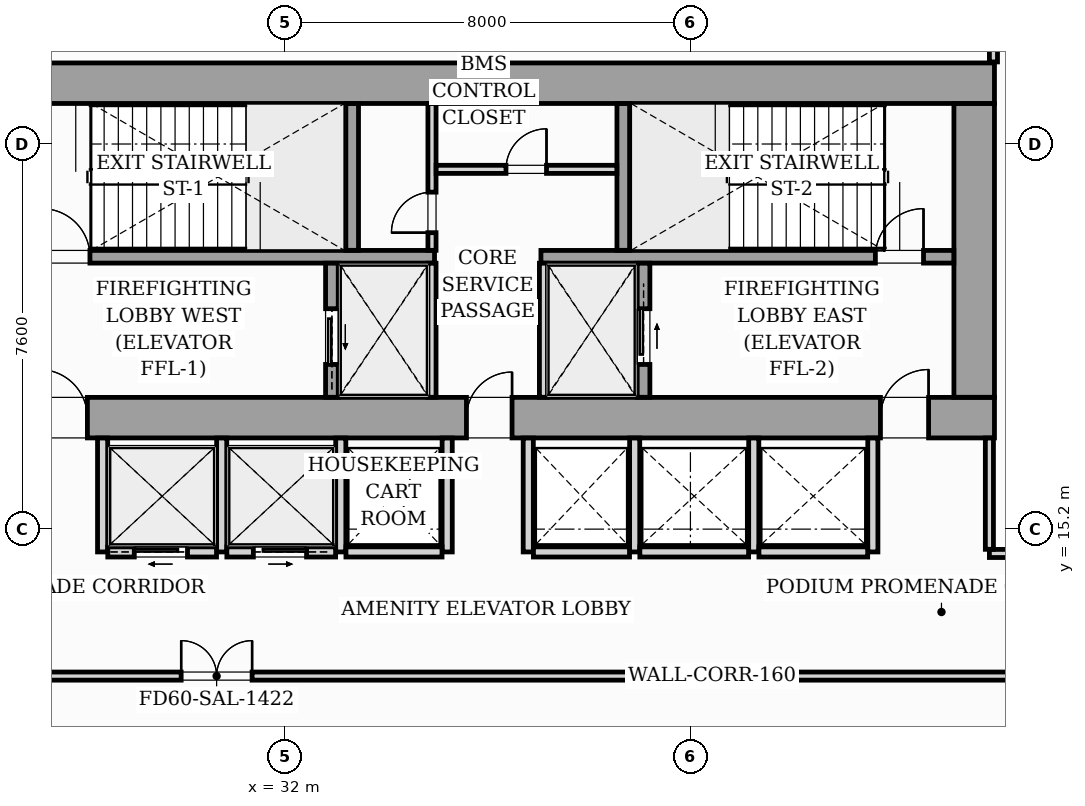
"""IFC4 building model, lengths in metres.
Left out: names, types, materials, properties, quantities, classifications, styles, units other than length and angle.
Written with IfcOpenShell. Run it as: python <this file> out.ifc"""

import sys

from ifc_helpers import new_model, si_unit, direction, frame, frame_2d, origin, origin_2d, place, context, subcontext, project, spatial, rectangle, i_section, extrude, source, transform, mapped, element, fill, save


model = new_model("IFC4")
c1 = context("Model", 3, precision=1e-05, world=origin(), true_north=direction((0.0, 1.0)))
c2 = subcontext(c1, "Body", "Model", "MODEL_VIEW")
j1 = project(units=[si_unit("LENGTHUNIT", "METRE"), si_unit("PLANEANGLEUNIT", "RADIAN")], contexts=[c1])
p1 = place(None, origin())
s1 = spatial("IfcSite", under=j1, at=p1, CompositionType="ELEMENT")
p2 = place(p1, origin())
s2 = spatial("IfcBuilding", under=s1, at=p2, CompositionType="ELEMENT")
p3 = place(p2, frame((0.0, 0.0, 5.0)))
s3 = spatial("IfcBuildingStorey", under=s2, at=p3, CompositionType="ELEMENT", Elevation=5.0)
m1 = source(origin(), c2, "Body", "SweptSolid", [
    extrude(i_section(OverallWidth=0.437, OverallDepth=0.514, WebThickness=0.061, FlangeThickness=0.097, FilletRadius=0.018, at=origin_2d()), origin(), (0.0, 0.0, 1.0), 4.496),
])
for number, where, z_axis, x_axis in (
    (1, (33.12, 17.4, 0.002), (0.0, 0.0, 1.0), (1.0, 0.0, 0.0)),
    (2, (38.88, 17.4, 0.002), (0.0, 0.0, 1.0), (1.0, 0.0, 0.0)),
    (3, (45.6, 17.4, 0.002), (0.0, 0.0, 1.0), (1.0, 0.0, 0.0)),
    (4, (33.12, 24.0, 0.002), (0.0, 0.0, 1.0), (1.0, 0.0, 0.0)),
    (5, (38.88, 24.0, 0.002), (0.0, 0.0, 1.0), (1.0, 0.0, 0.0)),
    (6, (45.6, 24.0, 0.002), (0.0, 0.0, 1.0), (1.0, 0.0, 0.0)),
):
    element("IfcColumn", number, at=place(p3, frame(where, z_axis=z_axis, x_axis=x_axis)), inside=s3, PredefinedType="PILASTER", context=c2, shape_type="MappedRepresentation", body=[
        mapped(m1, transform((0.0, 0.0, 0.0), scale=1.0)),
    ])
p4 = place(p3, frame((26.0, 17.4, 0.0), z_axis=(0.0, 0.0, 1.0), x_axis=(1.0, 0.0, 0.0)))
e7 = element("IfcWall", 7, at=p4, inside=s3, PredefinedType="SHEAR", context=c2, shape_type="SweptSolid", body=[
    extrude(rectangle(XDim=20.0, YDim=0.8, at=frame_2d((10.0, 0.0))), origin(), (0.0, 0.0, 1.0), 4.5),
])
p5 = place(p4, frame((1.15, 0.0, 0.0)))
e8 = element("IfcOpeningElement", 8, at=p5, cuts=e7, PredefinedType="OPENING", context=c2, shape_type="SweptSolid", body=[
    extrude(rectangle(XDim=0.95, YDim=2.06, at=frame_2d((0.475, 1.03))), frame((0.0, 0.41, 0.0), z_axis=(0.0, -1.0, 0.0), x_axis=(1.0, 0.0, 0.0)), (0.0, 0.0, 1.0), 0.82),
])
p6 = place(p4, frame((9.58, 0.0, 0.0)))
e9 = element("IfcOpeningElement", 9, at=p6, cuts=e7, PredefinedType="OPENING", context=c2, shape_type="SweptSolid", body=[
    extrude(rectangle(XDim=0.9, YDim=2.06, at=frame_2d((0.45, 1.03))), frame((0.0, 0.41, 0.0), z_axis=(0.0, -1.0, 0.0), x_axis=(1.0, 0.0, 0.0)), (0.0, 0.0, 1.0), 0.82),
])
p7 = place(p4, frame((17.75, 0.0, 0.0)))
e10 = element("IfcOpeningElement", 10, at=p7, cuts=e7, PredefinedType="OPENING", context=c2, shape_type="SweptSolid", body=[
    extrude(rectangle(XDim=0.95, YDim=2.06, at=frame_2d((0.475, 1.03))), frame((0.0, 0.41, 0.0), z_axis=(0.0, -1.0, 0.0), x_axis=(1.0, 0.0, 0.0)), (0.0, 0.0, 1.0), 0.82),
])
p8 = place(p3, frame((26.0, 24.0, 0.0), z_axis=(0.0, 0.0, 1.0), x_axis=(1.0, 0.0, 0.0)))
e11 = element("IfcWall", 11, at=p8, inside=s3, PredefinedType="SHEAR", context=c2, shape_type="SweptSolid", body=[
    extrude(rectangle(XDim=20.0, YDim=0.8, at=frame_2d((10.0, 0.0))), origin(), (0.0, 0.0, 1.0), 4.5),
])
p9 = place(p3, frame((45.6, 17.802, 0.0), z_axis=(0.0, 0.0, 1.0), x_axis=(0.0, 1.0, 0.0)))
e12 = element("IfcWall", 12, at=p9, inside=s3, PredefinedType="SHEAR", context=c2, shape_type="SweptSolid", body=[
    extrude(rectangle(XDim=5.796, YDim=0.8, at=frame_2d((2.898, 0.0))), origin(), (0.0, 0.0, 1.0), 4.5),
])
p10 = place(p3, frame((26.802, 20.575, 0.0), z_axis=(0.0, 0.0, 1.0), x_axis=(1.0, 0.0, 0.0)))
e13 = element("IfcWall", 13, at=p10, inside=s3, PredefinedType="SOLIDWALL", context=c2, shape_type="SweptSolid", body=[
    extrude(rectangle(XDim=8.148, YDim=0.25, at=frame_2d((4.074, 0.0))), origin(), (0.0, 0.0, 1.0), 4.5),
])
p11 = place(p10, frame((0.398, 0.0, 0.0)))
e14 = element("IfcOpeningElement", 14, at=p11, cuts=e13, PredefinedType="OPENING", context=c2, shape_type="SweptSolid", body=[
    extrude(rectangle(XDim=0.95, YDim=2.06, at=frame_2d((0.475, 1.03))), frame((0.0, 0.135, 0.0), z_axis=(0.0, -1.0, 0.0), x_axis=(1.0, 0.0, 0.0)), (0.0, 0.0, 1.0), 0.27),
])
p12 = place(p3, frame((37.05, 20.575, 0.0), z_axis=(0.0, 0.0, 1.0), x_axis=(1.0, 0.0, 0.0)))
e15 = element("IfcWall", 15, at=p12, inside=s3, PredefinedType="SOLIDWALL", context=c2, shape_type="SweptSolid", body=[
    extrude(rectangle(XDim=8.148, YDim=0.25, at=frame_2d((4.074, 0.0))), origin(), (0.0, 0.0, 1.0), 4.5),
])
p13 = place(p12, frame((6.6, 0.0, 0.0)))
e16 = element("IfcOpeningElement", 16, at=p13, cuts=e15, PredefinedType="OPENING", context=c2, shape_type="SweptSolid", body=[
    extrude(rectangle(XDim=0.95, YDim=2.06, at=frame_2d((0.475, 1.03))), frame((0.0, 0.135, 0.0), z_axis=(0.0, -1.0, 0.0), x_axis=(1.0, 0.0, 0.0)), (0.0, 0.0, 1.0), 0.27),
])
for number, where, z_axis, x_axis in (
    (17, (33.325, 20.702, 0.0), (0.0, 0.0, 1.0), (0.0, 1.0, 0.0)),
    (18, (38.675, 20.702, 0.0), (0.0, 0.0, 1.0), (0.0, 1.0, 0.0)),
):
    element("IfcWall", number, at=place(p3, frame(where, z_axis=z_axis, x_axis=x_axis)), inside=s3, PredefinedType="SOLIDWALL", context=c2, shape_type="SweptSolid", body=[
        extrude(rectangle(XDim=2.896, YDim=0.25, at=frame_2d((1.448, 0.0))), origin(), (0.0, 0.0, 1.0), 4.5),
    ])
p14 = place(p3, frame((32.925, 17.802, 0.0), z_axis=(0.0, 0.0, 1.0), x_axis=(0.0, 1.0, 0.0)))
e19 = element("IfcWall", 19, at=p14, inside=s3, PredefinedType="SOLIDWALL", context=c2, shape_type="SweptSolid", body=[
    extrude(rectangle(XDim=2.646, YDim=0.25, at=frame_2d((1.323, 0.0))), origin(), (0.0, 0.0, 1.0), 4.5),
])
p15 = place(p14, frame((0.648, 0.0, 0.0)))
e20 = element("IfcOpeningElement", 20, at=p15, cuts=e19, PredefinedType="OPENING", context=c2, shape_type="SweptSolid", body=[
    extrude(rectangle(XDim=1.1, YDim=2.08, at=frame_2d((0.55, 1.04))), frame((0.0, 0.135, 0.0), z_axis=(0.0, -1.0, 0.0), x_axis=(1.0, 0.0, 0.0)), (0.0, 0.0, 1.0), 0.27),
])
for number, where, z_axis, x_axis in (
    (21, (34.9, 17.802, 0.0), (0.0, 0.0, 1.0), (0.0, 1.0, 0.0)),
    (22, (37.1, 17.802, 0.0), (0.0, 0.0, 1.0), (0.0, 1.0, 0.0)),
):
    element("IfcWall", number, at=place(p3, frame(where, z_axis=z_axis, x_axis=x_axis)), inside=s3, PredefinedType="PARTITIONING", context=c2, shape_type="SweptSolid", body=[
        extrude(rectangle(XDim=2.646, YDim=0.16, at=frame_2d((1.323, 0.0))), origin(), (0.0, 0.0, 1.0), 4.08),
    ])
p16 = place(p3, frame((39.075, 17.802, 0.0), z_axis=(0.0, 0.0, 1.0), x_axis=(0.0, 1.0, 0.0)))
e23 = element("IfcWall", 23, at=p16, inside=s3, PredefinedType="SOLIDWALL", context=c2, shape_type="SweptSolid", body=[
    extrude(rectangle(XDim=2.646, YDim=0.25, at=frame_2d((1.323, 0.0))), origin(), (0.0, 0.0, 1.0), 4.5),
])
p17 = place(p16, frame((0.648, 0.0, 0.0)))
e24 = element("IfcOpeningElement", 24, at=p17, cuts=e23, PredefinedType="OPENING", context=c2, shape_type="SweptSolid", body=[
    extrude(rectangle(XDim=1.1, YDim=2.08, at=frame_2d((0.55, 1.04))), frame((0.0, 0.135, 0.0), z_axis=(0.0, -1.0, 0.0), x_axis=(1.0, 0.0, 0.0)), (0.0, 0.0, 1.0), 0.27),
])
p18 = place(p3, frame((34.9, 20.702, 0.0), z_axis=(0.0, 0.0, 1.0), x_axis=(0.0, 1.0, 0.0)))
e25 = element("IfcWall", 25, at=p18, inside=s3, PredefinedType="PARTITIONING", context=c2, shape_type="SweptSolid", body=[
    extrude(rectangle(XDim=2.896, YDim=0.16, at=frame_2d((1.448, 0.0))), origin(), (0.0, 0.0, 1.0), 4.08),
])
p19 = place(p18, frame((0.348, 0.0, 0.0)))
e26 = element("IfcOpeningElement", 26, at=p19, cuts=e25, PredefinedType="OPENING", context=c2, shape_type="SweptSolid", body=[
    extrude(rectangle(XDim=0.8, YDim=2.05, at=frame_2d((0.4, 1.025))), frame((0.0, 0.09, 0.0), z_axis=(0.0, -1.0, 0.0), x_axis=(1.0, 0.0, 0.0)), (0.0, 0.0, 1.0), 0.18),
])
p20 = place(p3, frame((34.982, 22.3, 0.0), z_axis=(0.0, 0.0, 1.0), x_axis=(1.0, 0.0, 0.0)))
e27 = element("IfcWall", 27, at=p20, inside=s3, PredefinedType="PARTITIONING", context=c2, shape_type="SweptSolid", body=[
    extrude(rectangle(XDim=3.566, YDim=0.16, at=frame_2d((1.783, 0.0))), origin(), (0.0, 0.0, 1.0), 4.08),
])
p21 = place(p20, frame((1.378, 0.0, 0.0)))
e28 = element("IfcOpeningElement", 28, at=p21, cuts=e27, PredefinedType="OPENING", context=c2, shape_type="SweptSolid", body=[
    extrude(rectangle(XDim=0.8, YDim=2.05, at=frame_2d((0.4, 1.025))), frame((0.0, 0.09, 0.0), z_axis=(0.0, -1.0, 0.0), x_axis=(1.0, 0.0, 0.0)), (0.0, 0.0, 1.0), 0.18),
])
for number, where, z_axis, x_axis in (
    (29, (28.4, 14.75, 0.0), (0.0, 0.0, 1.0), (0.0, 1.0, 0.0)),
    (30, (30.75, 14.75, 0.0), (0.0, 0.0, 1.0), (0.0, 1.0, 0.0)),
    (31, (33.1, 14.75, 0.0), (0.0, 0.0, 1.0), (0.0, 1.0, 0.0)),
):
    element("IfcWall", number, at=place(p3, frame(where, z_axis=z_axis, x_axis=x_axis)), inside=s3, PredefinedType="PARTITIONING", context=c2, shape_type="SweptSolid", body=[
        extrude(rectangle(XDim=2.248, YDim=0.2, at=frame_2d((1.124, 0.0))), origin(), (0.0, 0.0, 1.0), 4.08),
    ])
p22 = place(p3, frame((28.502, 14.75, 0.0), z_axis=(0.0, 0.0, 1.0), x_axis=(1.0, 0.0, 0.0)))
e32 = element("IfcWall", 32, at=p22, inside=s3, PredefinedType="PARTITIONING", context=c2, shape_type="SweptSolid", body=[
    extrude(rectangle(XDim=2.146, YDim=0.2, at=frame_2d((1.073, 0.0))), origin(), (0.0, 0.0, 1.0), 4.08),
])
p23 = place(p22, frame((0.523, 0.0, 0.0)))
e33 = element("IfcOpeningElement", 33, at=p23, cuts=e32, PredefinedType="OPENING", context=c2, shape_type="SweptSolid", body=[
    extrude(rectangle(XDim=1.05, YDim=2.08, at=frame_2d((0.525, 1.04))), frame((0.0, 0.11, 0.0), z_axis=(0.0, -1.0, 0.0), x_axis=(1.0, 0.0, 0.0)), (0.0, 0.0, 1.0), 0.22),
])
p24 = place(p3, frame((30.852, 14.75, 0.0), z_axis=(0.0, 0.0, 1.0), x_axis=(1.0, 0.0, 0.0)))
e34 = element("IfcWall", 34, at=p24, inside=s3, PredefinedType="PARTITIONING", context=c2, shape_type="SweptSolid", body=[
    extrude(rectangle(XDim=2.146, YDim=0.2, at=frame_2d((1.073, 0.0))), origin(), (0.0, 0.0, 1.0), 4.08),
])
p25 = place(p24, frame((0.523, 0.0, 0.0)))
e35 = element("IfcOpeningElement", 35, at=p25, cuts=e34, PredefinedType="OPENING", context=c2, shape_type="SweptSolid", body=[
    extrude(rectangle(XDim=1.05, YDim=2.08, at=frame_2d((0.525, 1.04))), frame((0.0, 0.11, 0.0), z_axis=(0.0, -1.0, 0.0), x_axis=(1.0, 0.0, 0.0)), (0.0, 0.0, 1.0), 0.22),
])
p26 = place(p3, frame((35.2, 14.75, 0.0), z_axis=(0.0, 0.0, 1.0), x_axis=(0.0, 1.0, 0.0)))
e36 = element("IfcWall", 36, at=p26, inside=s3, PredefinedType="PARTITIONING", context=c2, shape_type="SweptSolid", body=[
    extrude(rectangle(XDim=2.248, YDim=0.2, at=frame_2d((1.124, 0.0))), origin(), (0.0, 0.0, 1.0), 4.08),
])
p27 = place(p3, frame((33.202, 14.75, 0.0), z_axis=(0.0, 0.0, 1.0), x_axis=(1.0, 0.0, 0.0)))
e37 = element("IfcWall", 37, at=p27, inside=s3, PredefinedType="PARTITIONING", context=c2, shape_type="SweptSolid", body=[
    extrude(rectangle(XDim=1.896, YDim=0.2, at=frame_2d((0.948, 0.0))), origin(), (0.0, 0.0, 1.0), 4.08),
])
for number, where, z_axis, x_axis in (
    (38, (36.8, 14.75, 0.0), (0.0, 0.0, 1.0), (0.0, 1.0, 0.0)),
    (39, (38.9, 14.75, 0.0), (0.0, 0.0, 1.0), (0.0, 1.0, 0.0)),
):
    element("IfcWall", number, at=place(p3, frame(where, z_axis=z_axis, x_axis=x_axis)), inside=s3, PredefinedType="PARTITIONING", context=c2, shape_type="SweptSolid", body=[
        extrude(rectangle(XDim=2.248, YDim=0.2, at=frame_2d((1.124, 0.0))), origin(), (0.0, 0.0, 1.0), 4.08),
    ])
p28 = place(p3, frame((36.902, 14.75, 0.0), z_axis=(0.0, 0.0, 1.0), x_axis=(1.0, 0.0, 0.0)))
e40 = element("IfcWall", 40, at=p28, inside=s3, PredefinedType="PARTITIONING", context=c2, shape_type="SweptSolid", body=[
    extrude(rectangle(XDim=1.896, YDim=0.2, at=frame_2d((0.948, 0.0))), origin(), (0.0, 0.0, 1.0), 4.08),
])
for number, where, z_axis, x_axis in (
    (41, (41.25, 14.75, 0.0), (0.0, 0.0, 1.0), (0.0, 1.0, 0.0)),
    (42, (43.6, 14.75, 0.0), (0.0, 0.0, 1.0), (0.0, 1.0, 0.0)),
):
    element("IfcWall", number, at=place(p3, frame(where, z_axis=z_axis, x_axis=x_axis)), inside=s3, PredefinedType="PARTITIONING", context=c2, shape_type="SweptSolid", body=[
        extrude(rectangle(XDim=2.248, YDim=0.2, at=frame_2d((1.124, 0.0))), origin(), (0.0, 0.0, 1.0), 4.08),
    ])
for number, where, z_axis, x_axis in (
    (43, (39.002, 14.75, 0.0), (0.0, 0.0, 1.0), (1.0, 0.0, 0.0)),
    (44, (41.352, 14.75, 0.0), (0.0, 0.0, 1.0), (1.0, 0.0, 0.0)),
):
    element("IfcWall", number, at=place(p3, frame(where, z_axis=z_axis, x_axis=x_axis)), inside=s3, PredefinedType="PARTITIONING", context=c2, shape_type="SweptSolid", body=[
        extrude(rectangle(XDim=2.146, YDim=0.2, at=frame_2d((1.073, 0.0))), origin(), (0.0, 0.0, 1.0), 4.08),
    ])
p29 = place(p3, frame((1.95, 12.3, 0.0), z_axis=(0.0, 0.0, 1.0), x_axis=(1.0, 0.0, 0.0)))
e45 = element("IfcWall", 45, at=p29, inside=s3, PredefinedType="PARTITIONING", context=c2, shape_type="SweptSolid", body=[
    extrude(rectangle(XDim=76.948, YDim=0.16, at=frame_2d((38.474, 0.0))), origin(), (0.0, 0.0, 1.0), 4.08),
])
p30 = place(p29, frame((6.5, 0.0, 0.0)))
e46 = element("IfcOpeningElement", 46, at=p30, cuts=e45, PredefinedType="OPENING", context=c2, shape_type="SweptSolid", body=[
    extrude(rectangle(XDim=1.4, YDim=2.08, at=frame_2d((0.7, 1.04))), frame((0.0, 0.09, 0.0), z_axis=(0.0, -1.0, 0.0), x_axis=(1.0, 0.0, 0.0)), (0.0, 0.0, 1.0), 0.18),
])
p31 = place(p29, frame((28.0, 0.0, 0.0)))
e47 = element("IfcOpeningElement", 47, at=p31, cuts=e45, PredefinedType="OPENING", context=c2, shape_type="SweptSolid", body=[
    extrude(rectangle(XDim=1.4, YDim=2.08, at=frame_2d((0.7, 1.04))), frame((0.0, 0.09, 0.0), z_axis=(0.0, -1.0, 0.0), x_axis=(1.0, 0.0, 0.0)), (0.0, 0.0, 1.0), 0.18),
])
p32 = place(p3, frame((45.9, 14.72, 0.0), z_axis=(0.0, 0.0, 1.0), x_axis=(1.0, 0.0, 0.0)))
e48 = element("IfcWall", 48, at=p32, inside=s3, PredefinedType="PARTITIONING", context=c2, shape_type="SweptSolid", body=[
    extrude(rectangle(XDim=32.998, YDim=0.16, at=frame_2d((16.499, 0.0))), origin(), (0.0, 0.0, 1.0), 4.08),
])
p33 = place(p32, frame((5.0, 0.0, 0.0)))
e49 = element("IfcOpeningElement", 49, at=p33, cuts=e48, PredefinedType="OPENING", context=c2, shape_type="SweptSolid", body=[
    extrude(rectangle(XDim=1.4, YDim=2.08, at=frame_2d((0.7, 1.04))), frame((0.0, 0.09, 0.0), z_axis=(0.0, -1.0, 0.0), x_axis=(1.0, 0.0, 0.0)), (0.0, 0.0, 1.0), 0.18),
])
p34 = place(p3, frame((45.98, 24.42, 0.0), z_axis=(0.0, 0.0, 1.0), x_axis=(0.0, 1.0, 0.0)))
e50 = element("IfcWall", 50, at=p34, inside=s3, PredefinedType="PARTITIONING", context=c2, shape_type="SweptSolid", body=[
    extrude(rectangle(XDim=11.03, YDim=0.16, at=frame_2d((5.515, 0.0))), origin(), (0.0, 0.0, 1.0), 4.08),
])
p35 = place(p3, frame((45.9, 14.802, 0.0), z_axis=(0.0, 0.0, 1.0), x_axis=(0.0, 1.0, 0.0)))
e51 = element("IfcWall", 51, at=p35, inside=s3, PredefinedType="PARTITIONING", context=c2, shape_type="SweptSolid", body=[
    extrude(rectangle(XDim=2.196, YDim=0.16, at=frame_2d((1.098, 0.0))), origin(), (0.0, 0.0, 1.0), 4.08),
])
m2 = source(origin(), c2, "Body", "SweptSolid", [
    extrude(rectangle(XDim=0.95, YDim=2.06, at=frame_2d((0.475, 1.03))), frame((0.0, 0.025, 0.0), z_axis=(0.0, -1.0, 0.0), x_axis=(1.0, 0.0, 0.0)), (0.0, 0.0, 1.0), 0.05),
])
p36 = place(p5, origin())
e52 = element("IfcDoor", 52, at=p36, inside=s3, OperationType="SINGLE_SWING_LEFT", PredefinedType="DOOR", context=c2, shape_type="MappedRepresentation", body=[
    mapped(m2, transform((0.0, 0.0, 0.0), scale=1.0)),
])
fill(e8, e52)
m3 = source(origin(), c2, "Body", "SweptSolid", [
    extrude(rectangle(XDim=0.9, YDim=2.06, at=frame_2d((0.45, 1.03))), frame((0.0, 0.025, 0.0), z_axis=(0.0, -1.0, 0.0), x_axis=(1.0, 0.0, 0.0)), (0.0, 0.0, 1.0), 0.05),
])
p37 = place(p6, origin())
e53 = element("IfcDoor", 53, at=p37, inside=s3, OperationType="SINGLE_SWING_RIGHT", PredefinedType="DOOR", context=c2, shape_type="MappedRepresentation", body=[
    mapped(m3, transform((0.0, 0.0, 0.0), scale=1.0)),
])
fill(e9, e53)
p38 = place(p7, origin())
e54 = element("IfcDoor", 54, at=p38, inside=s3, OperationType="SINGLE_SWING_RIGHT", PredefinedType="DOOR", context=c2, shape_type="MappedRepresentation", body=[
    mapped(m2, transform((0.0, 0.0, 0.0), scale=1.0)),
])
fill(e10, e54)
p39 = place(p11, origin())
e55 = element("IfcDoor", 55, at=p39, inside=s3, OperationType="SINGLE_SWING_LEFT", PredefinedType="DOOR", context=c2, shape_type="MappedRepresentation", body=[
    mapped(m2, transform((0.0, 0.0, 0.0), scale=1.0)),
])
fill(e14, e55)
p40 = place(p13, origin())
e56 = element("IfcDoor", 56, at=p40, inside=s3, OperationType="SINGLE_SWING_RIGHT", PredefinedType="DOOR", context=c2, shape_type="MappedRepresentation", body=[
    mapped(m2, transform((0.0, 0.0, 0.0), scale=1.0)),
])
fill(e16, e56)
m4 = source(origin(), c2, "Body", "SweptSolid", [
    extrude(rectangle(XDim=1.1, YDim=2.08, at=frame_2d((0.55, 1.04))), frame((0.0, 0.025, 0.0), z_axis=(0.0, -1.0, 0.0), x_axis=(1.0, 0.0, 0.0)), (0.0, 0.0, 1.0), 0.05),
])
p41 = place(p15, origin())
e57 = element("IfcDoor", 57, at=p41, inside=s3, OperationType="SLIDING_TO_LEFT", PredefinedType="DOOR", context=c2, shape_type="MappedRepresentation", body=[
    mapped(m4, transform((0.0, 0.0, 0.0), scale=1.0)),
])
fill(e20, e57)
p42 = place(p17, origin())
e58 = element("IfcDoor", 58, at=p42, inside=s3, OperationType="SLIDING_TO_RIGHT", PredefinedType="DOOR", context=c2, shape_type="MappedRepresentation", body=[
    mapped(m4, transform((0.0, 0.0, 0.0), scale=1.0)),
])
fill(e24, e58)
m5 = source(origin(), c2, "Body", "SweptSolid", [
    extrude(rectangle(XDim=0.8, YDim=2.05, at=frame_2d((0.4, 1.025))), frame((0.0, 0.025, 0.0), z_axis=(0.0, -1.0, 0.0), x_axis=(1.0, 0.0, 0.0)), (0.0, 0.0, 1.0), 0.05),
])
p43 = place(p19, origin())
e59 = element("IfcDoor", 59, at=p43, inside=s3, OperationType="SINGLE_SWING_LEFT", PredefinedType="DOOR", context=c2, shape_type="MappedRepresentation", body=[
    mapped(m5, transform((0.0, 0.0, 0.0), scale=1.0)),
])
fill(e26, e59)
p44 = place(p21, origin())
e60 = element("IfcDoor", 60, at=p44, inside=s3, OperationType="SINGLE_SWING_RIGHT", PredefinedType="DOOR", context=c2, shape_type="MappedRepresentation", body=[
    mapped(m5, transform((0.0, 0.0, 0.0), scale=1.0)),
])
fill(e28, e60)
m6 = source(origin(), c2, "Body", "SweptSolid", [
    extrude(rectangle(XDim=1.05, YDim=2.08, at=frame_2d((0.525, 1.04))), frame((0.0, 0.025, 0.0), z_axis=(0.0, -1.0, 0.0), x_axis=(1.0, 0.0, 0.0)), (0.0, 0.0, 1.0), 0.05),
])
p45 = place(p23, origin())
e61 = element("IfcDoor", 61, at=p45, inside=s3, OperationType="SLIDING_TO_LEFT", PredefinedType="DOOR", context=c2, shape_type="MappedRepresentation", body=[
    mapped(m6, transform((0.0, 0.0, 0.0), scale=1.0)),
])
fill(e33, e61)
p46 = place(p25, origin())
e62 = element("IfcDoor", 62, at=p46, inside=s3, OperationType="SLIDING_TO_RIGHT", PredefinedType="DOOR", context=c2, shape_type="MappedRepresentation", body=[
    mapped(m6, transform((0.0, 0.0, 0.0), scale=1.0)),
])
fill(e35, e62)
m7 = source(origin(), c2, "Body", "SweptSolid", [
    extrude(rectangle(XDim=1.4, YDim=2.08, at=frame_2d((0.7, 1.04))), frame((0.0, 0.025, 0.0), z_axis=(0.0, -1.0, 0.0), x_axis=(1.0, 0.0, 0.0)), (0.0, 0.0, 1.0), 0.05),
])
p47 = place(p31, origin())
e63 = element("IfcDoor", 63, at=p47, inside=s3, OperationType="DOUBLE_DOOR_SINGLE_SWING", PredefinedType="DOOR", context=c2, shape_type="MappedRepresentation", body=[
    mapped(m7, transform((0.0, 0.0, 0.0), scale=1.0)),
])
fill(e47, e63)
save(model, sys.argv[1])
